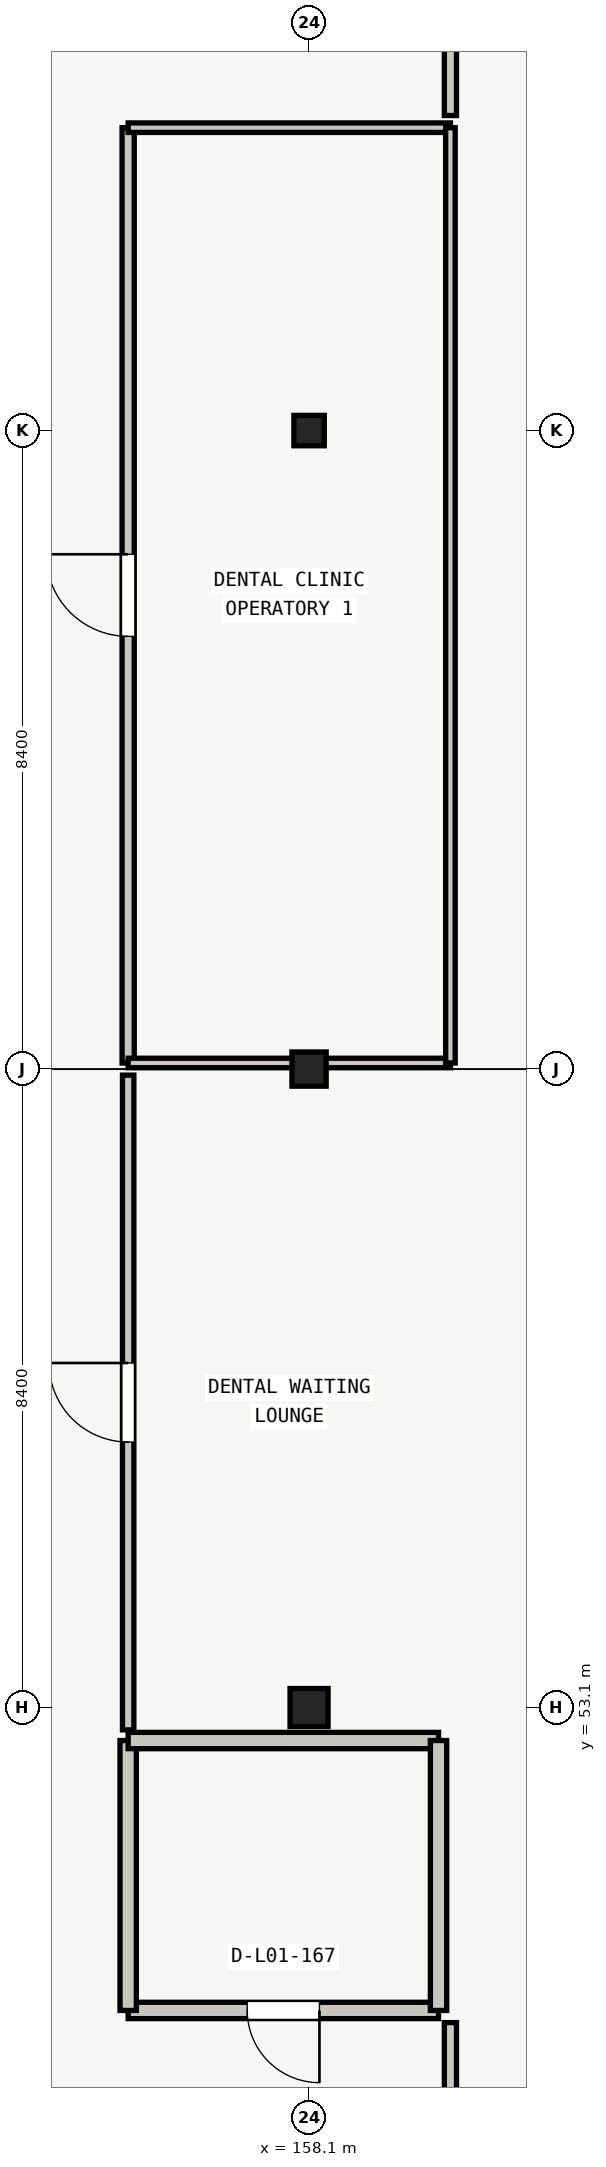
"""IFC4 building model, lengths in metres.
Left out: names, types, materials, properties, quantities, classifications, styles, units other than length and angle.
Written with IfcOpenShell. Run it as: python <this file> out.ifc"""

import sys

from ifc_helpers import new_model, si_unit, direction, frame, frame_2d, origin, origin_2d, place, context, subcontext, project, spatial, rectangle, extrude, element, fill, save


model = new_model("IFC4")
c1 = context("Model", 3, precision=1e-05, world=origin(), true_north=direction((0.0, 1.0)))
c2 = subcontext(c1, "Body", "Model", "MODEL_VIEW")
j1 = project(units=[si_unit("LENGTHUNIT", "METRE"), si_unit("PLANEANGLEUNIT", "RADIAN")], contexts=[c1])
p1 = place(None, origin())
s1 = spatial("IfcSite", under=j1, at=p1, CompositionType="ELEMENT")
p2 = place(p1, origin())
s2 = spatial("IfcBuilding", under=s1, at=p2, CompositionType="ELEMENT")
p3 = place(p2, frame((0.0, 0.0, 4.5)))
s3 = spatial("IfcBuildingStorey", under=s2, at=p3, CompositionType="ELEMENT", Elevation=4.5)
p4 = place(p3, frame((158.1, 53.1, 0.0), z_axis=(0.0, 0.0, 1.0), x_axis=(1.0, 0.0, 0.0)))
e1 = element("IfcColumn", 1, at=p4, inside=s3, PredefinedType="COLUMN", context=c2, shape_type="SweptSolid", body=[
    extrude(rectangle(XDim=0.5, YDim=0.5, at=origin_2d()), origin(), (0.0, 0.0, 1.0), 3.95),
])
p5 = place(p3, frame((158.1, 61.5, 0.0), z_axis=(0.0, 0.0, 1.0), x_axis=(1.0, 0.0, 0.0)))
e2 = element("IfcColumn", 2, at=p5, inside=s3, PredefinedType="COLUMN", context=c2, shape_type="SweptSolid", body=[
    extrude(rectangle(XDim=0.45, YDim=0.45, at=origin_2d()), origin(), (0.0, 0.0, 1.0), 3.95),
])
p6 = place(p3, frame((158.1, 69.9, 0.0), z_axis=(0.0, 0.0, 1.0), x_axis=(1.0, 0.0, 0.0)))
e3 = element("IfcColumn", 3, at=p6, inside=s3, PredefinedType="COLUMN", context=c2, shape_type="SweptSolid", body=[
    extrude(rectangle(XDim=0.4, YDim=0.4, at=origin_2d()), origin(), (0.0, 0.0, 1.0), 3.95),
])
p7 = place(p3, frame((159.803, 49.115, 0.0), z_axis=(0.0, 0.0, 1.0), x_axis=(-1.0, 0.0, 0.0)))
e4 = element("IfcWall", 4, at=p7, inside=s3, PredefinedType="PLUMBINGWALL", context=c2, shape_type="SweptSolid", body=[
    extrude(rectangle(XDim=4.083, YDim=0.215, at=frame_2d((2.042, 0.0))), origin(), (0.0, 0.0, 1.0), 2.97),
])
p8 = place(p7, frame((1.567, 0.0, 0.0)))
e5 = element("IfcOpeningElement", 5, at=p8, cuts=e4, PredefinedType="OPENING", context=c2, shape_type="SweptSolid", body=[
    extrude(rectangle(XDim=0.95, YDim=2.05, at=frame_2d((0.475, 1.025))), frame((0.0, 0.107, 0.0), z_axis=(0.0, -1.0, 0.0), x_axis=(1.0, 0.0, 0.0)), (0.0, 0.0, 1.0), 0.215),
])
p9 = place(p3, frame((155.72, 49.115, 0.0), z_axis=(0.0, 0.0, 1.0), x_axis=(0.0, 1.0, 0.0)))
e6 = element("IfcWall", 6, at=p9, inside=s3, PredefinedType="PLUMBINGWALL", context=c2, shape_type="SweptSolid", body=[
    extrude(rectangle(XDim=3.551, YDim=0.215, at=frame_2d((1.775, 0.0))), origin(), (0.0, 0.0, 1.0), 2.97),
])
p10 = place(p3, frame((155.72, 52.666, 0.0), z_axis=(0.0, 0.0, 1.0), x_axis=(1.0, 0.0, 0.0)))
e7 = element("IfcWall", 7, at=p10, inside=s3, PredefinedType="PLUMBINGWALL", context=c2, shape_type="SweptSolid", body=[
    extrude(rectangle(XDim=4.083, YDim=0.215, at=frame_2d((2.042, 0.0))), origin(), (0.0, 0.0, 1.0), 2.97),
])
p11 = place(p3, frame((159.803, 52.666, 0.0), z_axis=(0.0, 0.0, 1.0), x_axis=(0.0, -1.0, 0.0)))
e8 = element("IfcWall", 8, at=p11, inside=s3, PredefinedType="PLUMBINGWALL", context=c2, shape_type="SweptSolid", body=[
    extrude(rectangle(XDim=3.551, YDim=0.215, at=frame_2d((1.775, 0.0))), origin(), (0.0, 0.0, 1.0), 2.97),
])
p12 = place(p3, frame((155.72, 61.58, 0.0), z_axis=(0.0, 0.0, 1.0), x_axis=(0.0, 1.0, 0.0)))
e9 = element("IfcWall", 9, at=p12, inside=s3, PredefinedType="PARTITIONING", context=c2, shape_type="SweptSolid", body=[
    extrude(rectangle(XDim=12.305, YDim=0.16, at=frame_2d((6.152, 0.0))), origin(), (0.0, 0.0, 1.0), 2.97),
])
p13 = place(p12, frame((5.613, 0.0, 0.0)))
e10 = element("IfcOpeningElement", 10, at=p13, cuts=e9, PredefinedType="OPENING", context=c2, shape_type="SweptSolid", body=[
    extrude(rectangle(XDim=1.08, YDim=2.05, at=frame_2d((0.54, 1.025))), frame((0.0, 0.08, 0.0), z_axis=(0.0, -1.0, 0.0), x_axis=(1.0, 0.0, 0.0)), (0.0, 0.0, 1.0), 0.16),
])
for number, where, z_axis, x_axis in (
    (11, (159.96, 61.58, 0.0), (0.0, 0.0, 1.0), (-1.0, 0.0, 0.0)),
    (12, (155.72, 73.885, 0.0), (0.0, 0.0, 1.0), (1.0, 0.0, 0.0)),
):
    element("IfcWall", number, at=place(p3, frame(where, z_axis=z_axis, x_axis=x_axis)), inside=s3, PredefinedType="PARTITIONING", context=c2, shape_type="SweptSolid", body=[
        extrude(rectangle(XDim=4.24, YDim=0.125, at=frame_2d((2.12, 0.0))), origin(), (0.0, 0.0, 1.0), 2.97),
    ])
p14 = place(p3, frame((159.96, 73.885, 0.0), z_axis=(0.0, 0.0, 1.0), x_axis=(0.0, -1.0, 0.0)))
e13 = element("IfcWall", 13, at=p14, inside=s3, PredefinedType="PARTITIONING", context=c2, shape_type="SweptSolid", body=[
    extrude(rectangle(XDim=12.305, YDim=0.125, at=frame_2d((6.152, 0.0))), origin(), (0.0, 0.0, 1.0), 2.97),
])
p15 = place(p3, frame((159.96, 79.4, 0.0), z_axis=(0.0, 0.0, 1.0), x_axis=(0.0, -1.0, 0.0)))
e14 = element("IfcWall", 14, at=p15, inside=s3, PredefinedType="PARTITIONING", context=c2, shape_type="SweptSolid", body=[
    extrude(rectangle(XDim=5.355, YDim=0.16, at=frame_2d((2.677, 0.0))), origin(), (0.0, 0.0, 1.0), 2.97),
])
p16 = place(p15, frame((2.137, 0.0, 0.0)))
e15 = element("IfcOpeningElement", 15, at=p16, cuts=e14, PredefinedType="OPENING", context=c2, shape_type="SweptSolid", body=[
    extrude(rectangle(XDim=1.08, YDim=2.05, at=frame_2d((0.54, 1.025))), frame((0.0, 0.08, 0.0), z_axis=(0.0, -1.0, 0.0), x_axis=(1.0, 0.0, 0.0)), (0.0, 0.0, 1.0), 0.16),
])
p17 = place(p3, frame((155.72, 52.806, 0.0), z_axis=(0.0, 0.0, 1.0), x_axis=(0.0, 1.0, 0.0)))
e16 = element("IfcWall", 16, at=p17, inside=s3, PredefinedType="PARTITIONING", context=c2, shape_type="SweptSolid", body=[
    extrude(rectangle(XDim=8.614, YDim=0.15, at=frame_2d((4.307, 0.0))), origin(), (0.0, 0.0, 1.0), 2.97),
])
p18 = place(p17, frame((3.787, 0.0, 0.0)))
e17 = element("IfcOpeningElement", 17, at=p18, cuts=e16, PredefinedType="OPENING", context=c2, shape_type="SweptSolid", body=[
    extrude(rectangle(XDim=1.04, YDim=2.05, at=frame_2d((0.52, 1.025))), frame((0.0, 0.075, 0.0), z_axis=(0.0, -1.0, 0.0), x_axis=(1.0, 0.0, 0.0)), (0.0, 0.0, 1.0), 0.15),
])
p19 = place(p3, frame((159.96, 48.955, 0.0), z_axis=(0.0, 0.0, 1.0), x_axis=(0.0, -1.0, 0.0)))
e18 = element("IfcWall", 18, at=p19, inside=s3, PredefinedType="PARTITIONING", context=c2, shape_type="SweptSolid", body=[
    extrude(rectangle(XDim=3.905, YDim=0.16, at=frame_2d((1.953, 0.0))), origin(), (0.0, 0.0, 1.0), 2.97),
])
p20 = place(p19, frame((1.413, 0.0, 0.0)))
e19 = element("IfcOpeningElement", 19, at=p20, cuts=e18, PredefinedType="OPENING", context=c2, shape_type="SweptSolid", body=[
    extrude(rectangle(XDim=1.08, YDim=2.05, at=frame_2d((0.54, 1.025))), frame((0.0, 0.08, 0.0), z_axis=(0.0, -1.0, 0.0), x_axis=(1.0, 0.0, 0.0)), (0.0, 0.0, 1.0), 0.16),
])
p21 = place(p8, origin())
e20 = element("IfcDoor", 20, at=p21, inside=s3, OperationType="SINGLE_SWING_LEFT", PredefinedType="DOOR", context=c2, shape_type="SweptSolid", body=[
    extrude(rectangle(XDim=0.95, YDim=2.05, at=frame_2d((0.475, 1.025))), frame((0.0, 0.025, 0.0), z_axis=(0.0, -1.0, 0.0), x_axis=(1.0, 0.0, 0.0)), (0.0, 0.0, 1.0), 0.05),
])
fill(e5, e20)
p22 = place(p13, origin())
e21 = element("IfcDoor", 21, at=p22, inside=s3, OperationType="SINGLE_SWING_RIGHT", PredefinedType="DOOR", context=c2, shape_type="SweptSolid", body=[
    extrude(rectangle(XDim=1.08, YDim=2.05, at=frame_2d((0.54, 1.025))), frame((0.0, 0.025, 0.0), z_axis=(0.0, -1.0, 0.0), x_axis=(1.0, 0.0, 0.0)), (0.0, 0.0, 1.0), 0.05),
])
fill(e10, e21)
p23 = place(p18, origin())
e22 = element("IfcDoor", 22, at=p23, inside=s3, OperationType="SINGLE_SWING_RIGHT", PredefinedType="DOOR", context=c2, shape_type="SweptSolid", body=[
    extrude(rectangle(XDim=1.04, YDim=2.05, at=frame_2d((0.52, 1.025))), frame((0.0, 0.025, 0.0), z_axis=(0.0, -1.0, 0.0), x_axis=(1.0, 0.0, 0.0)), (0.0, 0.0, 1.0), 0.05),
])
fill(e17, e22)
save(model, sys.argv[1])
